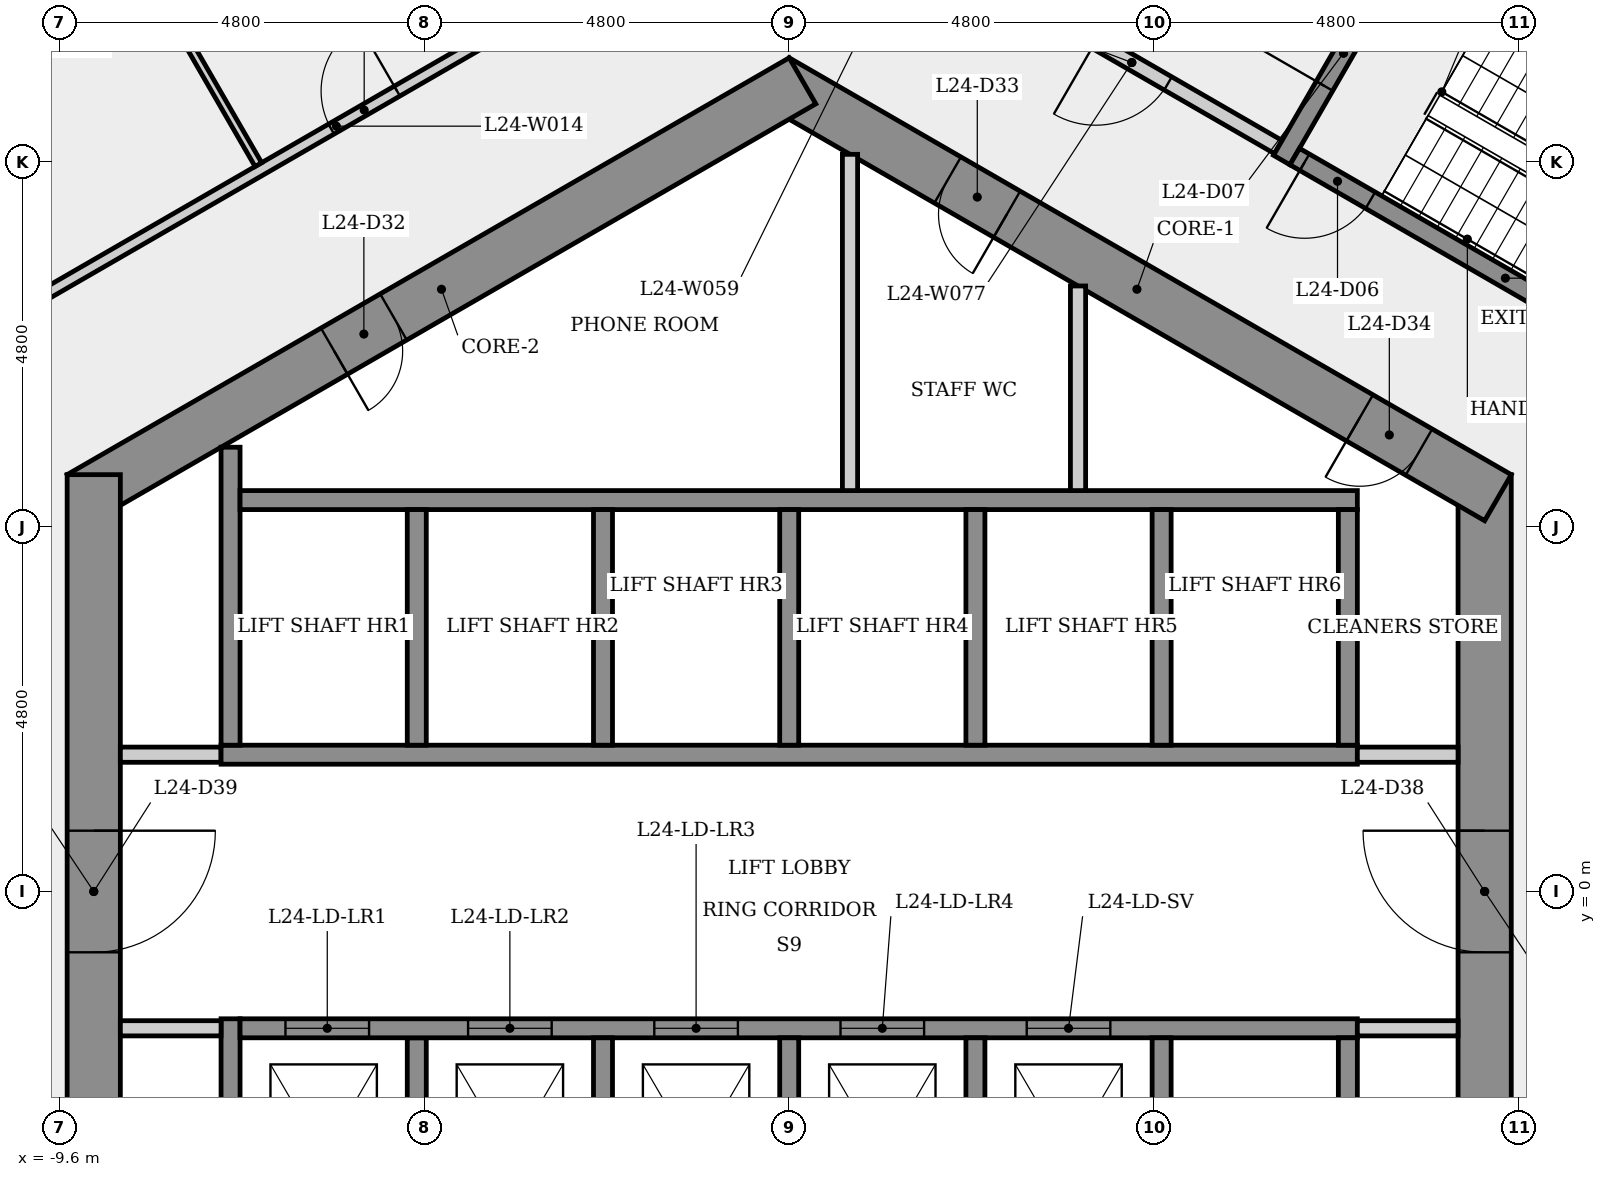
"""IFC4 building model, lengths in metres.
Left out: names, types, materials, properties, quantities, classifications, styles, units other than length and angle.
Written with IfcOpenShell. Run it as: python <this file> out.ifc"""

import sys

from ifc_helpers import new_model, si_unit, direction, frame, frame_2d, origin, place, context, subcontext, project, spatial, rectangle, extrude, element, fill, save


model = new_model("IFC4")
c1 = context("Model", 3, precision=1e-05, world=origin(), true_north=direction((0.0, 1.0)))
c2 = subcontext(c1, "Body", "Model", "MODEL_VIEW")
j1 = project(units=[si_unit("LENGTHUNIT", "METRE"), si_unit("PLANEANGLEUNIT", "RADIAN")], contexts=[c1])
p1 = place(None, origin())
s1 = spatial("IfcSite", under=j1, at=p1, CompositionType="ELEMENT")
p2 = place(p1, origin())
s2 = spatial("IfcBuilding", under=s1, at=p2, CompositionType="ELEMENT")
p3 = place(p2, frame((0.0, 0.0, 93.3)))
s3 = spatial("IfcBuildingStorey", under=s2, at=p3, CompositionType="ELEMENT", Elevation=93.3)
p4 = place(p3, frame((9.15, -5.485, 0.0), z_axis=(0.0, 0.0, 1.0), x_axis=(0.0, 1.0, 0.0)))
e1 = element("IfcWall", 1, at=p4, inside=s3, PredefinedType="SHEAR", context=c2, shape_type="SweptSolid", body=[
    extrude(rectangle(XDim=10.97, YDim=0.7, at=frame_2d((5.485, 0.0))), origin(), (0.0, 0.0, 1.0), 3.4),
])
p5 = place(p4, frame((4.685, 0.0, 0.0)))
e2 = element("IfcOpeningElement", 2, at=p5, cuts=e1, PredefinedType="OPENING", context=c2, shape_type="SweptSolid", body=[
    extrude(rectangle(XDim=1.6, YDim=2.1, at=frame_2d((0.8, 1.05))), frame((0.0, 0.36, 0.0), z_axis=(0.0, -1.0, 0.0), x_axis=(1.0, 0.0, 0.0)), (0.0, 0.0, 1.0), 0.72),
])
p6 = place(p3, frame((9.325, 5.182, 0.0), z_axis=(0.0, 0.0, 1.0), x_axis=(-0.866023993627, 0.500002442456, 0.0)))
e3 = element("IfcWall", 3, at=p6, inside=s3, PredefinedType="SHEAR", context=c2, shape_type="SweptSolid", body=[
    extrude(rectangle(XDim=10.97, YDim=0.7, at=frame_2d((5.485, 0.0))), origin(), (0.0, 0.0, 1.0), 3.4),
])
p7 = place(p6, frame((7.46, 0.0, 0.0)))
e4 = element("IfcOpeningElement", 4, at=p7, cuts=e3, PredefinedType="OPENING", context=c2, shape_type="SweptSolid", body=[
    extrude(rectangle(XDim=0.9, YDim=2.1, at=frame_2d((0.45, 1.05))), frame((0.0, 0.36, 0.0), z_axis=(0.0, -1.0, 0.0), x_axis=(1.0, 0.0, 0.0)), (0.0, 0.0, 1.0), 0.72),
])
p8 = place(p6, frame((1.201, 0.0, 0.0)))
e5 = element("IfcOpeningElement", 5, at=p8, cuts=e3, PredefinedType="OPENING", context=c2, shape_type="SweptSolid", body=[
    extrude(rectangle(XDim=0.9, YDim=2.1, at=frame_2d((0.45, 1.05))), frame((0.0, 0.36, 0.0), z_axis=(0.0, -1.0, 0.0), x_axis=(1.0, 0.0, 0.0)), (0.0, 0.0, 1.0), 0.72),
])
p9 = place(p3, frame((0.175, 10.667, 0.0), z_axis=(0.0, 0.0, 1.0), x_axis=(-0.866023993627, -0.500002442456, 0.0)))
e6 = element("IfcWall", 6, at=p9, inside=s3, PredefinedType="SHEAR", context=c2, shape_type="SweptSolid", body=[
    extrude(rectangle(XDim=10.97, YDim=0.7, at=frame_2d((5.485, 0.0))), origin(), (0.0, 0.0, 1.0), 3.4),
])
p10 = place(p9, frame((6.214, 0.0, 0.0)))
e7 = element("IfcOpeningElement", 7, at=p10, cuts=e6, PredefinedType="OPENING", context=c2, shape_type="SweptSolid", body=[
    extrude(rectangle(XDim=0.9, YDim=2.1, at=frame_2d((0.45, 1.05))), frame((0.0, 0.36, 0.0), z_axis=(0.0, -1.0, 0.0), x_axis=(1.0, 0.0, 0.0)), (0.0, 0.0, 1.0), 0.72),
])
p11 = place(p3, frame((-9.15, 5.485, 0.0), z_axis=(0.0, 0.0, 1.0), x_axis=(0.0, -1.0, 0.0)))
e8 = element("IfcWall", 8, at=p11, inside=s3, PredefinedType="SHEAR", context=c2, shape_type="SweptSolid", body=[
    extrude(rectangle(XDim=10.97, YDim=0.7, at=frame_2d((5.485, 0.0))), origin(), (0.0, 0.0, 1.0), 3.4),
])
p12 = place(p11, frame((4.685, 0.0, 0.0)))
e9 = element("IfcOpeningElement", 9, at=p12, cuts=e8, PredefinedType="OPENING", context=c2, shape_type="SweptSolid", body=[
    extrude(rectangle(XDim=1.6, YDim=2.1, at=frame_2d((0.8, 1.05))), frame((0.0, 0.36, 0.0), z_axis=(0.0, -1.0, 0.0), x_axis=(1.0, 0.0, 0.0)), (0.0, 0.0, 1.0), 0.72),
])
p13 = place(p3, frame((-10.624, 7.376, 0.0), z_axis=(0.0, 0.0, 1.0), x_axis=(0.86602446816, 0.500001620546, 0.0)))
e10 = element("IfcWall", 10, at=p13, inside=s3, PredefinedType="PARTITIONING", context=c2, shape_type="SweptSolid", body=[
    extrude(rectangle(XDim=10.775, YDim=0.15, at=frame_2d((5.387, 0.0))), origin(), (0.0, 0.0, 1.0), 3.05),
])
p14 = place(p13, frame((5.31, 0.0, 0.0)))
e11 = element("IfcOpeningElement", 11, at=p14, cuts=e10, PredefinedType="OPENING", context=c2, shape_type="SweptSolid", body=[
    extrude(rectangle(XDim=1.0, YDim=2.1, at=frame_2d((0.5, 1.05))), frame((0.0, 0.085, 0.0), z_axis=(0.0, -1.0, 0.0), x_axis=(1.0, 0.0, 0.0)), (0.0, 0.0, 1.0), 0.17),
])
p15 = place(p3, frame((-8.8, 1.8, 0.0), z_axis=(0.0, 0.0, 1.0), x_axis=(1.0, 0.0, 0.0)))
e12 = element("IfcWall", 12, at=p15, inside=s3, PredefinedType="PARTITIONING", context=c2, shape_type="SweptSolid", body=[
    extrude(rectangle(XDim=1.325, YDim=0.2, at=frame_2d((0.663, 0.0))), origin(), (0.0, 0.0, 1.0), 3.05),
])
p16 = place(p3, frame((-7.475, 1.8, 0.0), z_axis=(0.0, 0.0, 1.0), x_axis=(1.0, 0.0, 0.0)))
e13 = element("IfcWall", 13, at=p16, inside=s3, PredefinedType="SHEAR", context=c2, shape_type="SweptSolid", body=[
    extrude(rectangle(XDim=14.95, YDim=0.25, at=frame_2d((7.475, 0.0))), origin(), (0.0, 0.0, 1.0), 3.05),
])
p17 = place(p3, frame((-7.35, -5.846, 0.0), z_axis=(0.0, 0.0, 1.0), x_axis=(0.0, 1.0, 0.0)))
e14 = element("IfcWall", 14, at=p17, inside=s3, PredefinedType="SHEAR", context=c2, shape_type="SweptSolid", body=[
    extrude(rectangle(XDim=4.171, YDim=0.25, at=frame_2d((2.085, 0.0))), origin(), (0.0, 0.0, 1.0), 3.05),
])
p18 = place(p3, frame((-7.35, 1.925, 0.0), z_axis=(0.0, 0.0, 1.0), x_axis=(0.0, 1.0, 0.0)))
e15 = element("IfcWall", 15, at=p18, inside=s3, PredefinedType="SHEAR", context=c2, shape_type="SweptSolid", body=[
    extrude(rectangle(XDim=3.921, YDim=0.25, at=frame_2d((1.96, 0.0))), origin(), (0.0, 0.0, 1.0), 3.05),
])
p19 = place(p3, frame((-7.225, 5.15, 0.0), z_axis=(0.0, 0.0, 1.0), x_axis=(1.0, 0.0, 0.0)))
e16 = element("IfcWall", 16, at=p19, inside=s3, PredefinedType="SHEAR", context=c2, shape_type="SweptSolid", body=[
    extrude(rectangle(XDim=14.7, YDim=0.25, at=frame_2d((7.35, 0.0))), origin(), (0.0, 0.0, 1.0), 3.05),
])
p20 = place(p3, frame((-7.475, -1.8, 0.0), z_axis=(0.0, 0.0, 1.0), x_axis=(-1.0, 0.0, 0.0)))
e17 = element("IfcWall", 17, at=p20, inside=s3, PredefinedType="PARTITIONING", context=c2, shape_type="SweptSolid", body=[
    extrude(rectangle(XDim=1.325, YDim=0.2, at=frame_2d((0.663, 0.0))), origin(), (0.0, 0.0, 1.0), 3.05),
])
p21 = place(p3, frame((-6.984, 9.564, 0.0), z_axis=(0.0, 0.0, 1.0), x_axis=(-0.499997453958, 0.866026873738, 0.0)))
e18 = element("IfcWall", 18, at=p21, inside=s3, PredefinedType="PARTITIONING", context=c2, shape_type="SweptSolid", body=[
    extrude(rectangle(XDim=7.71, YDim=0.1, at=frame_2d((3.855, 0.0))), origin(), (0.0, 0.0, 1.0), 3.05),
])
for number, where, z_axis, x_axis in (
    (19, (-4.9, -1.925, 0.0), (0.0, 0.0, 1.0), (0.0, -1.0, 0.0)),
    (20, (-4.9, 5.025, 0.0), (0.0, 0.0, 1.0), (0.0, -1.0, 0.0)),
):
    element("IfcWall", number, at=place(p3, frame(where, z_axis=z_axis, x_axis=x_axis)), inside=s3, PredefinedType="SHEAR", context=c2, shape_type="SweptSolid", body=[
        extrude(rectangle(XDim=3.1, YDim=0.25, at=frame_2d((1.55, 0.0))), origin(), (0.0, 0.0, 1.0), 3.4),
    ])
p22 = place(p3, frame((-7.225, -1.8, 0.0), z_axis=(0.0, 0.0, 1.0), x_axis=(1.0, 0.0, 0.0)))
e21 = element("IfcWall", 21, at=p22, inside=s3, PredefinedType="SHEAR", context=c2, shape_type="SweptSolid", body=[
    extrude(rectangle(XDim=14.7, YDim=0.25, at=frame_2d((7.35, 0.0))), origin(), (0.0, 0.0, 1.0), 3.05),
])
p23 = place(p22, frame((0.597, 0.0, 0.0)))
e22 = element("IfcOpeningElement", 22, at=p23, cuts=e21, PredefinedType="OPENING", context=c2, shape_type="SweptSolid", body=[
    extrude(rectangle(XDim=1.1, YDim=2.1, at=frame_2d((0.55, 1.05))), frame((0.0, 0.135, 0.0), z_axis=(0.0, -1.0, 0.0), x_axis=(1.0, 0.0, 0.0)), (0.0, 0.0, 1.0), 0.27),
])
p24 = place(p22, frame((3.0, 0.0, 0.0)))
e23 = element("IfcOpeningElement", 23, at=p24, cuts=e21, PredefinedType="OPENING", context=c2, shape_type="SweptSolid", body=[
    extrude(rectangle(XDim=1.1, YDim=2.1, at=frame_2d((0.55, 1.05))), frame((0.0, 0.135, 0.0), z_axis=(0.0, -1.0, 0.0), x_axis=(1.0, 0.0, 0.0)), (0.0, 0.0, 1.0), 0.27),
])
p25 = place(p22, frame((5.45, 0.0, 0.0)))
e24 = element("IfcOpeningElement", 24, at=p25, cuts=e21, PredefinedType="OPENING", context=c2, shape_type="SweptSolid", body=[
    extrude(rectangle(XDim=1.1, YDim=2.1, at=frame_2d((0.55, 1.05))), frame((0.0, 0.135, 0.0), z_axis=(0.0, -1.0, 0.0), x_axis=(1.0, 0.0, 0.0)), (0.0, 0.0, 1.0), 0.27),
])
p26 = place(p22, frame((7.9, 0.0, 0.0)))
e25 = element("IfcOpeningElement", 25, at=p26, cuts=e21, PredefinedType="OPENING", context=c2, shape_type="SweptSolid", body=[
    extrude(rectangle(XDim=1.1, YDim=2.1, at=frame_2d((0.55, 1.05))), frame((0.0, 0.135, 0.0), z_axis=(0.0, -1.0, 0.0), x_axis=(1.0, 0.0, 0.0)), (0.0, 0.0, 1.0), 0.27),
])
p27 = place(p22, frame((10.35, 0.0, 0.0)))
e26 = element("IfcOpeningElement", 26, at=p27, cuts=e21, PredefinedType="OPENING", context=c2, shape_type="SweptSolid", body=[
    extrude(rectangle(XDim=1.1, YDim=2.1, at=frame_2d((0.55, 1.05))), frame((0.0, 0.135, 0.0), z_axis=(0.0, -1.0, 0.0), x_axis=(1.0, 0.0, 0.0)), (0.0, 0.0, 1.0), 0.27),
])
for number, where, z_axis, x_axis in (
    (27, (-2.45, -1.925, 0.0), (0.0, 0.0, 1.0), (0.0, -1.0, 0.0)),
    (28, (-2.45, 5.025, 0.0), (0.0, 0.0, 1.0), (0.0, -1.0, 0.0)),
    (29, (0.0, -1.925, 0.0), (0.0, 0.0, 1.0), (0.0, -1.0, 0.0)),
    (30, (0.0, 5.025, 0.0), (0.0, 0.0, 1.0), (0.0, -1.0, 0.0)),
):
    element("IfcWall", number, at=place(p3, frame(where, z_axis=z_axis, x_axis=x_axis)), inside=s3, PredefinedType="SHEAR", context=c2, shape_type="SweptSolid", body=[
        extrude(rectangle(XDim=3.1, YDim=0.25, at=frame_2d((1.55, 0.0))), origin(), (0.0, 0.0, 1.0), 3.4),
    ])
p28 = place(p3, frame((0.8, 9.699, 0.0), z_axis=(0.0, 0.0, 1.0), x_axis=(0.0, -1.0, 0.0)))
e31 = element("IfcWall", 31, at=p28, inside=s3, PredefinedType="PARTITIONING", context=c2, shape_type="SweptSolid", body=[
    extrude(rectangle(XDim=4.425, YDim=0.2, at=frame_2d((2.212, 0.0))), origin(), (0.0, 0.0, 1.0), 3.05),
])
for number, where, z_axis, x_axis in (
    (32, (2.45, -1.925, 0.0), (0.0, 0.0, 1.0), (0.0, -1.0, 0.0)),
    (33, (2.45, 5.025, 0.0), (0.0, 0.0, 1.0), (0.0, -1.0, 0.0)),
):
    element("IfcWall", number, at=place(p3, frame(where, z_axis=z_axis, x_axis=x_axis)), inside=s3, PredefinedType="SHEAR", context=c2, shape_type="SweptSolid", body=[
        extrude(rectangle(XDim=3.1, YDim=0.25, at=frame_2d((1.55, 0.0))), origin(), (0.0, 0.0, 1.0), 3.4),
    ])
p29 = place(p3, frame((3.8, 7.967, 0.0), z_axis=(0.0, 0.0, 1.0), x_axis=(0.0, -1.0, 0.0)))
e34 = element("IfcWall", 34, at=p29, inside=s3, PredefinedType="PARTITIONING", context=c2, shape_type="SweptSolid", body=[
    extrude(rectangle(XDim=2.692, YDim=0.2, at=frame_2d((1.346, 0.0))), origin(), (0.0, 0.0, 1.0), 3.05),
])
for number, where, z_axis, x_axis in (
    (35, (4.9, -1.925, 0.0), (0.0, 0.0, 1.0), (0.0, -1.0, 0.0)),
    (36, (4.9, 5.025, 0.0), (0.0, 0.0, 1.0), (0.0, -1.0, 0.0)),
):
    element("IfcWall", number, at=place(p3, frame(where, z_axis=z_axis, x_axis=x_axis)), inside=s3, PredefinedType="SHEAR", context=c2, shape_type="SweptSolid", body=[
        extrude(rectangle(XDim=3.1, YDim=0.25, at=frame_2d((1.55, 0.0))), origin(), (0.0, 0.0, 1.0), 3.4),
    ])
p30 = place(p3, frame((6.435, 9.795, 0.0), z_axis=(0.0, 0.0, 1.0), x_axis=(-0.866012907634, 0.500021643343, 0.0)))
e37 = element("IfcWall", 37, at=p30, inside=s3, PredefinedType="PARTITIONING", context=c2, shape_type="SweptSolid", body=[
    extrude(rectangle(XDim=4.45, YDim=0.2, at=frame_2d((2.225, 0.0))), origin(), (0.0, 0.0, 1.0), 3.05),
])
p31 = place(p30, frame((1.675, 0.0, 0.0)))
e38 = element("IfcOpeningElement", 38, at=p31, cuts=e37, PredefinedType="OPENING", context=c2, shape_type="SweptSolid", body=[
    extrude(rectangle(XDim=1.1, YDim=2.1, at=frame_2d((0.55, 1.05))), frame((0.0, 0.11, 0.0), z_axis=(0.0, -1.0, 0.0), x_axis=(1.0, 0.0, 0.0)), (0.0, 0.0, 1.0), 0.22),
])
p32 = place(p3, frame((6.48, 9.624, 0.0), z_axis=(0.0, 0.0, 1.0), x_axis=(0.500017246033, 0.866015446554, 0.0)))
e39 = element("IfcWall", 39, at=p32, inside=s3, PredefinedType="SHEAR", context=c2, shape_type="SweptSolid", body=[
    extrude(rectangle(XDim=3.25, YDim=0.25, at=frame_2d((1.625, 0.0))), origin(), (0.0, 0.0, 1.0), 3.05),
])
p33 = place(p32, frame((1.125, 0.0, 0.0)))
e40 = element("IfcOpeningElement", 40, at=p33, cuts=e39, PredefinedType="OPENING", context=c2, shape_type="SweptSolid", body=[
    extrude(rectangle(XDim=1.0, YDim=2.1, at=frame_2d((0.5, 1.05))), frame((0.0, 0.135, 0.0), z_axis=(0.0, -1.0, 0.0), x_axis=(1.0, 0.0, 0.0)), (0.0, 0.0, 1.0), 0.27),
])
p34 = place(p3, frame((7.475, 1.8, 0.0), z_axis=(0.0, 0.0, 1.0), x_axis=(1.0, 0.0, 0.0)))
e41 = element("IfcWall", 41, at=p34, inside=s3, PredefinedType="PARTITIONING", context=c2, shape_type="SweptSolid", body=[
    extrude(rectangle(XDim=1.325, YDim=0.2, at=frame_2d((0.663, 0.0))), origin(), (0.0, 0.0, 1.0), 3.05),
])
for number, where, z_axis, x_axis in (
    (42, (7.35, -1.925, 0.0), (0.0, 0.0, 1.0), (0.0, -1.0, 0.0)),
    (43, (7.35, 5.025, 0.0), (0.0, 0.0, 1.0), (0.0, -1.0, 0.0)),
):
    element("IfcWall", number, at=place(p3, frame(where, z_axis=z_axis, x_axis=x_axis)), inside=s3, PredefinedType="SHEAR", context=c2, shape_type="SweptSolid", body=[
        extrude(rectangle(XDim=3.1, YDim=0.25, at=frame_2d((1.55, 0.0))), origin(), (0.0, 0.0, 1.0), 3.4),
    ])
p35 = place(p3, frame((8.151, 12.268, 0.0), z_axis=(0.0, 0.0, 1.0), x_axis=(0.866025499775, -0.499999833739, 0.0)))
e44 = element("IfcWall", 44, at=p35, inside=s3, PredefinedType="SHEAR", context=c2, shape_type="SweptSolid", body=[
    extrude(rectangle(XDim=6.4, YDim=0.25, at=frame_2d((3.2, 0.0))), origin(), (0.0, 0.0, 1.0), 3.05),
])
p36 = place(p3, frame((8.8, -1.8, 0.0), z_axis=(0.0, 0.0, 1.0), x_axis=(-1.0, 0.0, 0.0)))
e45 = element("IfcWall", 45, at=p36, inside=s3, PredefinedType="PARTITIONING", context=c2, shape_type="SweptSolid", body=[
    extrude(rectangle(XDim=1.325, YDim=0.2, at=frame_2d((0.663, 0.0))), origin(), (0.0, 0.0, 1.0), 3.05),
])
p37 = place(p3, frame((12.194, 6.47, 0.0), z_axis=(0.0, 0.0, 1.0), x_axis=(-0.866025499775, 0.499999833739, 0.0)))
e46 = element("IfcWall", 46, at=p37, inside=s3, PredefinedType="SHEAR", context=c2, shape_type="SweptSolid", body=[
    extrude(rectangle(XDim=6.4, YDim=0.25, at=frame_2d((3.2, 0.0))), origin(), (0.0, 0.0, 1.0), 3.05),
])
p38 = place(p37, frame((5.25, 0.0, 0.0)))
e47 = element("IfcOpeningElement", 47, at=p38, cuts=e46, PredefinedType="OPENING", context=c2, shape_type="SweptSolid", body=[
    extrude(rectangle(XDim=1.0, YDim=2.1, at=frame_2d((0.5, 1.05))), frame((0.0, 0.135, 0.0), z_axis=(0.0, -1.0, 0.0), x_axis=(1.0, 0.0, 0.0)), (0.0, 0.0, 1.0), 0.27),
])
p39 = place(p23, origin())
e48 = element("IfcDoor", 48, at=p39, inside=s3, OperationType="SLIDING_TO_LEFT", PredefinedType="DOOR", context=c2, shape_type="SweptSolid", body=[
    extrude(rectangle(XDim=1.1, YDim=2.1, at=frame_2d((0.55, 1.05))), frame((0.0, 0.025, 0.0), z_axis=(0.0, -1.0, 0.0), x_axis=(1.0, 0.0, 0.0)), (0.0, 0.0, 1.0), 0.05),
])
fill(e22, e48)
p40 = place(p24, origin())
e49 = element("IfcDoor", 49, at=p40, inside=s3, OperationType="SLIDING_TO_LEFT", PredefinedType="DOOR", context=c2, shape_type="SweptSolid", body=[
    extrude(rectangle(XDim=1.1, YDim=2.1, at=frame_2d((0.55, 1.05))), frame((0.0, 0.025, 0.0), z_axis=(0.0, -1.0, 0.0), x_axis=(1.0, 0.0, 0.0)), (0.0, 0.0, 1.0), 0.05),
])
fill(e23, e49)
p41 = place(p25, origin())
e50 = element("IfcDoor", 50, at=p41, inside=s3, OperationType="SLIDING_TO_LEFT", PredefinedType="DOOR", context=c2, shape_type="SweptSolid", body=[
    extrude(rectangle(XDim=1.1, YDim=2.1, at=frame_2d((0.55, 1.05))), frame((0.0, 0.025, 0.0), z_axis=(0.0, -1.0, 0.0), x_axis=(1.0, 0.0, 0.0)), (0.0, 0.0, 1.0), 0.05),
])
fill(e24, e50)
p42 = place(p26, origin())
e51 = element("IfcDoor", 51, at=p42, inside=s3, OperationType="SLIDING_TO_LEFT", PredefinedType="DOOR", context=c2, shape_type="SweptSolid", body=[
    extrude(rectangle(XDim=1.1, YDim=2.1, at=frame_2d((0.55, 1.05))), frame((0.0, 0.025, 0.0), z_axis=(0.0, -1.0, 0.0), x_axis=(1.0, 0.0, 0.0)), (0.0, 0.0, 1.0), 0.05),
])
fill(e25, e51)
p43 = place(p27, origin())
e52 = element("IfcDoor", 52, at=p43, inside=s3, OperationType="SLIDING_TO_LEFT", PredefinedType="DOOR", context=c2, shape_type="SweptSolid", body=[
    extrude(rectangle(XDim=1.1, YDim=2.1, at=frame_2d((0.55, 1.05))), frame((0.0, 0.025, 0.0), z_axis=(0.0, -1.0, 0.0), x_axis=(1.0, 0.0, 0.0)), (0.0, 0.0, 1.0), 0.05),
])
fill(e26, e52)
p44 = place(p38, origin())
e53 = element("IfcDoor", 53, at=p44, inside=s3, OperationType="SINGLE_SWING_RIGHT", PredefinedType="DOOR", context=c2, shape_type="SweptSolid", body=[
    extrude(rectangle(XDim=1.0, YDim=2.1, at=frame_2d((0.5, 1.05))), frame((0.0, 0.025, 0.0), z_axis=(0.0, -1.0, 0.0), x_axis=(1.0, 0.0, 0.0)), (0.0, 0.0, 1.0), 0.05),
])
fill(e47, e53)
p45 = place(p33, origin())
e54 = element("IfcDoor", 54, at=p45, inside=s3, OperationType="SINGLE_SWING_LEFT", PredefinedType="DOOR", context=c2, shape_type="SweptSolid", body=[
    extrude(rectangle(XDim=1.0, YDim=2.1, at=frame_2d((0.5, 1.05))), frame((0.0, 0.025, 0.0), z_axis=(0.0, -1.0, 0.0), x_axis=(1.0, 0.0, 0.0)), (0.0, 0.0, 1.0), 0.05),
])
fill(e40, e54)
p46 = place(p31, origin())
e55 = element("IfcDoor", 55, at=p46, inside=s3, OperationType="SINGLE_SWING_RIGHT", PredefinedType="DOOR", context=c2, shape_type="SweptSolid", body=[
    extrude(rectangle(XDim=1.1, YDim=2.1, at=frame_2d((0.55, 1.05))), frame((0.0, 0.025, 0.0), z_axis=(0.0, -1.0, 0.0), x_axis=(1.0, 0.0, 0.0)), (0.0, 0.0, 1.0), 0.05),
])
fill(e38, e55)
p47 = place(p14, origin())
e56 = element("IfcDoor", 56, at=p47, inside=s3, OperationType="SINGLE_SWING_RIGHT", PredefinedType="DOOR", context=c2, shape_type="SweptSolid", body=[
    extrude(rectangle(XDim=1.0, YDim=2.1, at=frame_2d((0.5, 1.05))), frame((0.0, 0.025, 0.0), z_axis=(0.0, -1.0, 0.0), x_axis=(1.0, 0.0, 0.0)), (0.0, 0.0, 1.0), 0.05),
])
fill(e11, e56)
p48 = place(p10, origin())
e57 = element("IfcDoor", 57, at=p48, inside=s3, OperationType="SINGLE_SWING_RIGHT", PredefinedType="DOOR", context=c2, shape_type="SweptSolid", body=[
    extrude(rectangle(XDim=0.9, YDim=2.1, at=frame_2d((0.45, 1.05))), frame((0.0, 0.025, 0.0), z_axis=(0.0, -1.0, 0.0), x_axis=(1.0, 0.0, 0.0)), (0.0, 0.0, 1.0), 0.05),
])
fill(e7, e57)
p49 = place(p7, origin())
e58 = element("IfcDoor", 58, at=p49, inside=s3, OperationType="SINGLE_SWING_LEFT", PredefinedType="DOOR", context=c2, shape_type="SweptSolid", body=[
    extrude(rectangle(XDim=0.9, YDim=2.1, at=frame_2d((0.45, 1.05))), frame((0.0, 0.025, 0.0), z_axis=(0.0, -1.0, 0.0), x_axis=(1.0, 0.0, 0.0)), (0.0, 0.0, 1.0), 0.05),
])
fill(e4, e58)
p50 = place(p8, origin())
e59 = element("IfcDoor", 59, at=p50, inside=s3, OperationType="SINGLE_SWING_RIGHT", PredefinedType="DOOR", context=c2, shape_type="SweptSolid", body=[
    extrude(rectangle(XDim=0.9, YDim=2.1, at=frame_2d((0.45, 1.05))), frame((0.0, 0.025, 0.0), z_axis=(0.0, -1.0, 0.0), x_axis=(1.0, 0.0, 0.0)), (0.0, 0.0, 1.0), 0.05),
])
fill(e5, e59)
p51 = place(p5, origin())
e60 = element("IfcDoor", 60, at=p51, inside=s3, OperationType="SINGLE_SWING_RIGHT", PredefinedType="DOOR", context=c2, shape_type="SweptSolid", body=[
    extrude(rectangle(XDim=1.6, YDim=2.1, at=frame_2d((0.8, 1.05))), frame((0.0, 0.025, 0.0), z_axis=(0.0, -1.0, 0.0), x_axis=(1.0, 0.0, 0.0)), (0.0, 0.0, 1.0), 0.05),
])
fill(e2, e60)
p52 = place(p12, origin())
e61 = element("IfcDoor", 61, at=p52, inside=s3, OperationType="SINGLE_SWING_LEFT", PredefinedType="DOOR", context=c2, shape_type="SweptSolid", body=[
    extrude(rectangle(XDim=1.6, YDim=2.1, at=frame_2d((0.8, 1.05))), frame((0.0, 0.025, 0.0), z_axis=(0.0, -1.0, 0.0), x_axis=(1.0, 0.0, 0.0)), (0.0, 0.0, 1.0), 0.05),
])
fill(e9, e61)
save(model, sys.argv[1])
